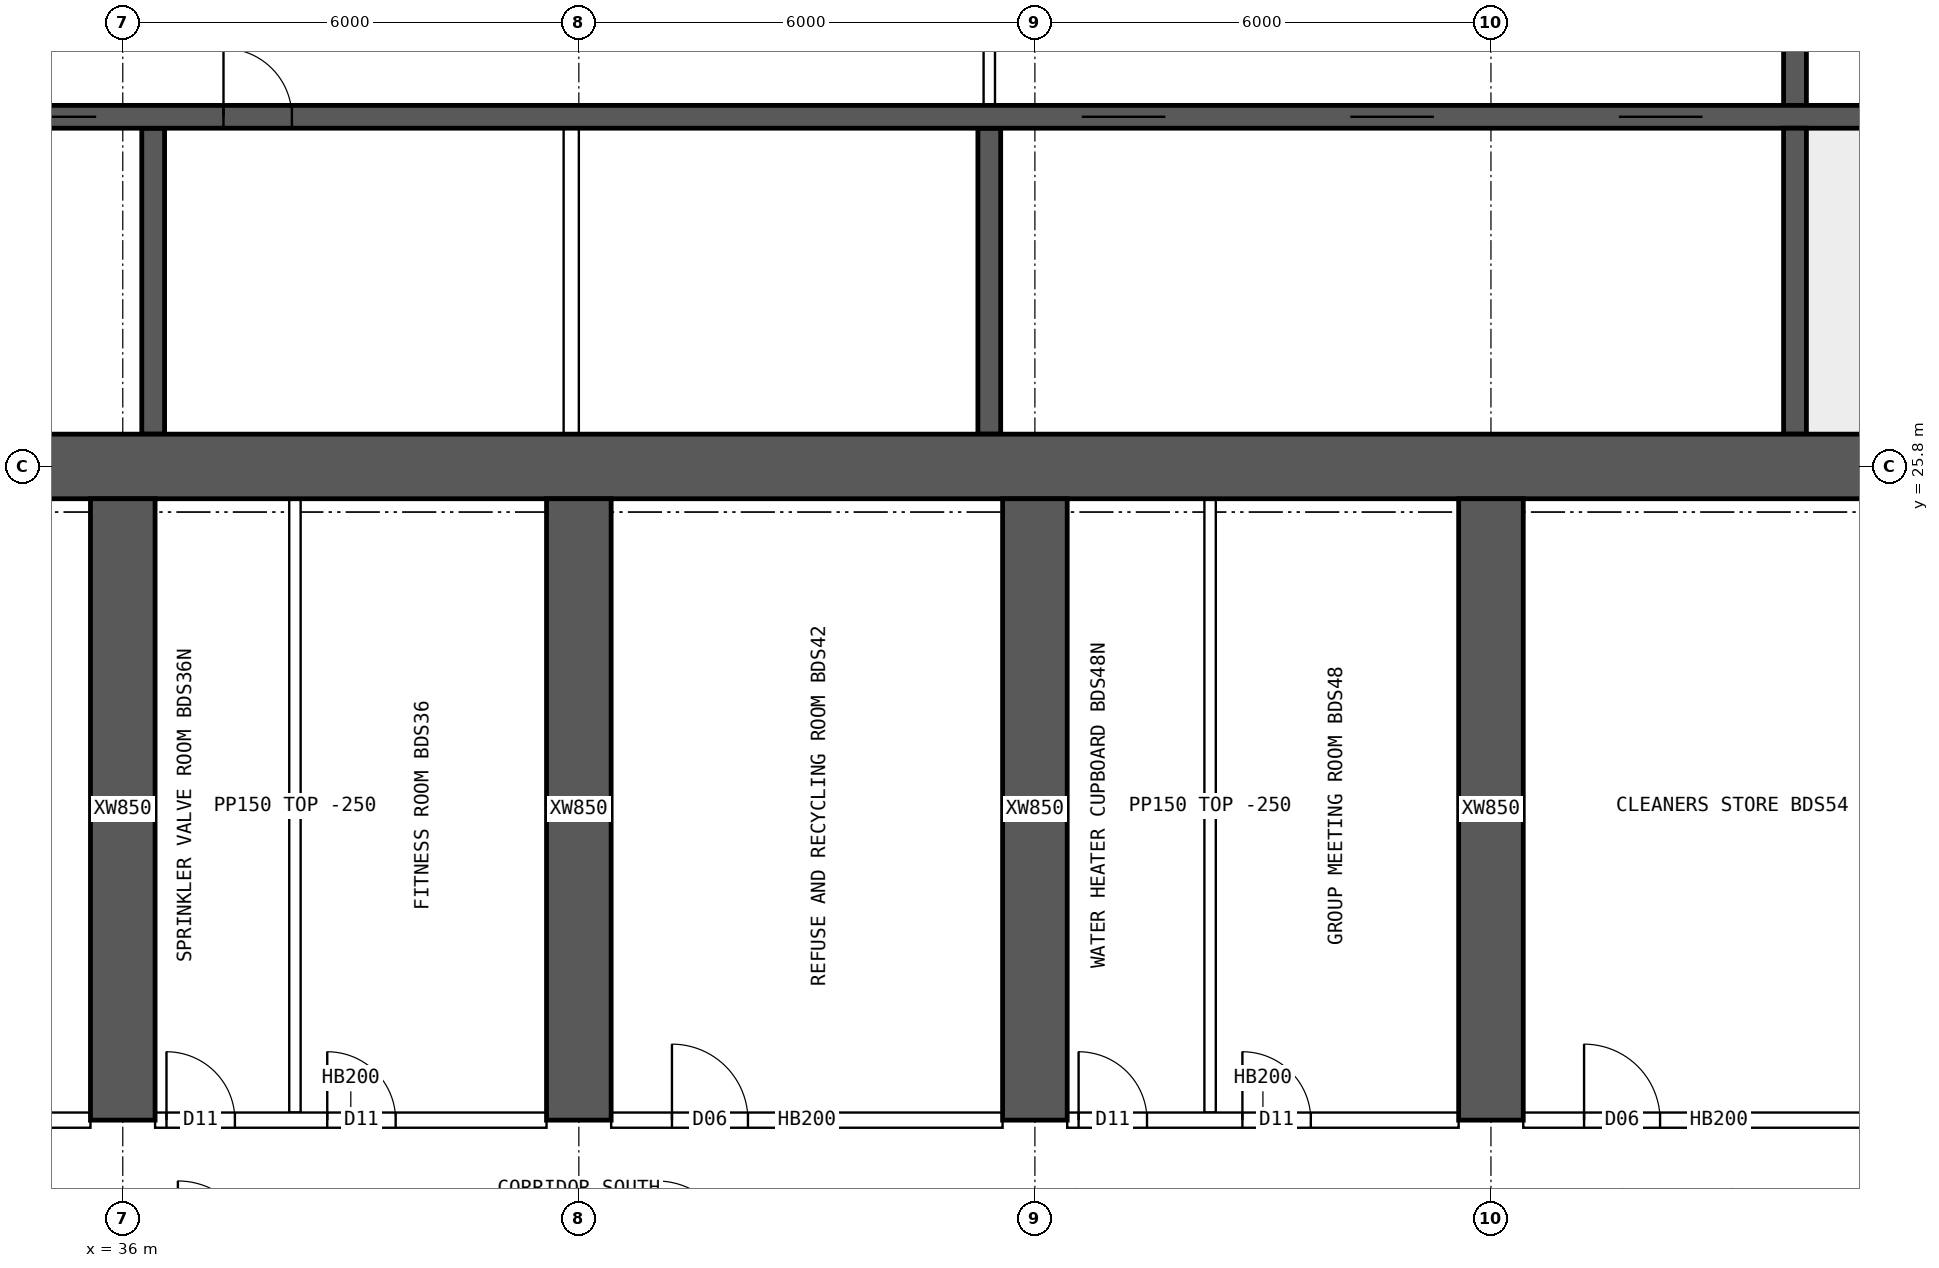
"""IFC4 building model, lengths in metres.
Left out: names, types, materials, properties, quantities, classifications, styles, units other than length and angle.
Written with IfcOpenShell. Run it as: python <this file> out.ifc"""

import sys

from ifc_helpers import new_model, si_unit, direction, frame, frame_2d, origin, place, context, subcontext, project, spatial, rectangle, extrude, element, fill, save


model = new_model("IFC4")
c1 = context("Model", 3, precision=1e-05, world=origin(), true_north=direction((0.0, 1.0)))
c2 = subcontext(c1, "Body", "Model", "MODEL_VIEW")
j1 = project(units=[si_unit("LENGTHUNIT", "METRE"), si_unit("PLANEANGLEUNIT", "RADIAN")], contexts=[c1])
p1 = place(None, origin())
s1 = spatial("IfcSite", under=j1, at=p1, CompositionType="ELEMENT")
p2 = place(p1, origin())
s2 = spatial("IfcBuilding", under=s1, at=p2, CompositionType="ELEMENT")
p3 = place(p2, frame((0.0, 0.0, 193.6)))
s3 = spatial("IfcBuildingStorey", under=s2, at=p3, CompositionType="ELEMENT", Elevation=193.6)
p4 = place(p3, frame((18.0, 25.8, 0.0), z_axis=(0.0, 0.0, 1.0), x_axis=(1.0, 0.0, 0.0)))
e1 = element("IfcWall", 1, at=p4, inside=s3, PredefinedType="SHEAR", context=c2, shape_type="SweptSolid", body=[
    extrude(rectangle(XDim=48.0, YDim=0.85, at=frame_2d((24.0, 0.0))), origin(), (0.0, 0.0, 1.0), 3.75),
])
p5 = place(p3, frame((18.425, 30.4, 0.0), z_axis=(0.0, 0.0, 1.0), x_axis=(1.0, 0.0, 0.0)))
e2 = element("IfcWall", 2, at=p5, inside=s3, PredefinedType="SHEAR", context=c2, shape_type="SweptSolid", body=[
    extrude(rectangle(XDim=47.15, YDim=0.3, at=frame_2d((23.575, 0.0))), origin(), (0.0, 0.0, 1.0), 3.75),
])
p6 = place(p5, frame((0.4, 0.0, 0.0)))
e3 = element("IfcOpeningElement", 3, at=p6, cuts=e2, PredefinedType="OPENING", context=c2, shape_type="SweptSolid", body=[
    extrude(rectangle(XDim=1.0, YDim=2.1, at=frame_2d((0.5, 1.05))), frame((0.0, 0.16, 0.0), z_axis=(0.0, -1.0, 0.0), x_axis=(1.0, 0.0, 0.0)), (0.0, 0.0, 1.0), 0.32),
])
p7 = place(p5, frame((45.75, 0.0, 0.0)))
e4 = element("IfcOpeningElement", 4, at=p7, cuts=e2, PredefinedType="OPENING", context=c2, shape_type="SweptSolid", body=[
    extrude(rectangle(XDim=1.0, YDim=2.1, at=frame_2d((0.5, 1.05))), frame((0.0, 0.16, 0.0), z_axis=(0.0, -1.0, 0.0), x_axis=(1.0, 0.0, 0.0)), (0.0, 0.0, 1.0), 0.32),
])
p8 = place(p5, frame((8.325, 0.0, 0.0)))
e5 = element("IfcOpeningElement", 5, at=p8, cuts=e2, PredefinedType="OPENING", context=c2, shape_type="SweptSolid", body=[
    extrude(rectangle(XDim=1.1, YDim=2.1, at=frame_2d((0.55, 1.05))), frame((0.0, 0.16, 0.0), z_axis=(0.0, -1.0, 0.0), x_axis=(1.0, 0.0, 0.0)), (0.0, 0.0, 1.0), 0.32),
])
p9 = place(p5, frame((10.925, 0.0, 0.0)))
e6 = element("IfcOpeningElement", 6, at=p9, cuts=e2, PredefinedType="OPENING", context=c2, shape_type="SweptSolid", body=[
    extrude(rectangle(XDim=1.1, YDim=2.1, at=frame_2d((0.55, 1.05))), frame((0.0, 0.16, 0.0), z_axis=(0.0, -1.0, 0.0), x_axis=(1.0, 0.0, 0.0)), (0.0, 0.0, 1.0), 0.32),
])
p10 = place(p5, frame((13.525, 0.0, 0.0)))
e7 = element("IfcOpeningElement", 7, at=p10, cuts=e2, PredefinedType="OPENING", context=c2, shape_type="SweptSolid", body=[
    extrude(rectangle(XDim=1.1, YDim=2.1, at=frame_2d((0.55, 1.05))), frame((0.0, 0.16, 0.0), z_axis=(0.0, -1.0, 0.0), x_axis=(1.0, 0.0, 0.0)), (0.0, 0.0, 1.0), 0.32),
])
p11 = place(p5, frame((16.125, 0.0, 0.0)))
e8 = element("IfcOpeningElement", 8, at=p11, cuts=e2, PredefinedType="OPENING", context=c2, shape_type="SweptSolid", body=[
    extrude(rectangle(XDim=1.1, YDim=2.1, at=frame_2d((0.55, 1.05))), frame((0.0, 0.16, 0.0), z_axis=(0.0, -1.0, 0.0), x_axis=(1.0, 0.0, 0.0)), (0.0, 0.0, 1.0), 0.32),
])
p12 = place(p5, frame((18.9, 0.0, 0.0)))
e9 = element("IfcOpeningElement", 9, at=p12, cuts=e2, PredefinedType="OPENING", context=c2, shape_type="SweptSolid", body=[
    extrude(rectangle(XDim=0.9, YDim=2.1, at=frame_2d((0.45, 1.05))), frame((0.0, 0.16, 0.0), z_axis=(0.0, -1.0, 0.0), x_axis=(1.0, 0.0, 0.0)), (0.0, 0.0, 1.0), 0.32),
])
p13 = place(p5, frame((30.192, 0.0, 0.0)))
e10 = element("IfcOpeningElement", 10, at=p13, cuts=e2, PredefinedType="OPENING", context=c2, shape_type="SweptSolid", body=[
    extrude(rectangle(XDim=1.1, YDim=2.1, at=frame_2d((0.55, 1.05))), frame((0.0, 0.16, 0.0), z_axis=(0.0, -1.0, 0.0), x_axis=(1.0, 0.0, 0.0)), (0.0, 0.0, 1.0), 0.32),
])
p14 = place(p5, frame((33.725, 0.0, 0.0)))
e11 = element("IfcOpeningElement", 11, at=p14, cuts=e2, PredefinedType="OPENING", context=c2, shape_type="SweptSolid", body=[
    extrude(rectangle(XDim=1.1, YDim=2.1, at=frame_2d((0.55, 1.05))), frame((0.0, 0.16, 0.0), z_axis=(0.0, -1.0, 0.0), x_axis=(1.0, 0.0, 0.0)), (0.0, 0.0, 1.0), 0.32),
])
p15 = place(p5, frame((37.258, 0.0, 0.0)))
e12 = element("IfcOpeningElement", 12, at=p15, cuts=e2, PredefinedType="OPENING", context=c2, shape_type="SweptSolid", body=[
    extrude(rectangle(XDim=1.1, YDim=2.1, at=frame_2d((0.55, 1.05))), frame((0.0, 0.16, 0.0), z_axis=(0.0, -1.0, 0.0), x_axis=(1.0, 0.0, 0.0)), (0.0, 0.0, 1.0), 0.32),
])
p16 = place(p3, frame((58.0, 26.225, 0.0), z_axis=(0.0, 0.0, 1.0), x_axis=(0.0, 1.0, 0.0)))
e13 = element("IfcWall", 13, at=p16, inside=s3, PredefinedType="SHEAR", context=c2, shape_type="SweptSolid", body=[
    extrude(rectangle(XDim=4.025, YDim=0.3, at=frame_2d((2.012, 0.0))), origin(), (0.0, 0.0, 1.0), 3.75),
])
p17 = place(p3, frame((58.0, 30.55, 0.0), z_axis=(0.0, 0.0, 1.0), x_axis=(0.0, 1.0, 0.0)))
e14 = element("IfcWall", 14, at=p17, inside=s3, PredefinedType="SHEAR", context=c2, shape_type="SweptSolid", body=[
    extrude(rectangle(XDim=3.9, YDim=0.3, at=frame_2d((1.95, 0.0))), origin(), (0.0, 0.0, 1.0), 3.75),
])
p18 = place(p17, frame((1.4, 0.0, 0.0)))
e15 = element("IfcOpeningElement", 15, at=p18, cuts=e14, PredefinedType="OPENING", context=c2, shape_type="SweptSolid", body=[
    extrude(rectangle(XDim=1.2, YDim=2.1, at=frame_2d((0.6, 1.05))), frame((0.0, 0.16, 0.0), z_axis=(0.0, -1.0, 0.0), x_axis=(1.0, 0.0, 0.0)), (0.0, 0.0, 1.0), 0.32),
])
for number, where, z_axis, x_axis in (
    (16, (36.4, 26.225, 0.0), (0.0, 0.0, 1.0), (0.0, 1.0, 0.0)),
    (17, (47.4, 26.225, 0.0), (0.0, 0.0, 1.0), (0.0, 1.0, 0.0)),
):
    element("IfcWall", number, at=place(p3, frame(where, z_axis=z_axis, x_axis=x_axis)), inside=s3, PredefinedType="SHEAR", context=c2, shape_type="SweptSolid", body=[
        extrude(rectangle(XDim=4.025, YDim=0.3, at=frame_2d((2.012, 0.0))), origin(), (0.0, 0.0, 1.0), 3.75),
    ])
for number, where, z_axis, x_axis in (
    (18, (36.0, 17.2, 0.0), (0.0, 0.0, 1.0), (0.0, 1.0, 0.0)),
    (19, (42.0, 17.2, 0.0), (0.0, 0.0, 1.0), (0.0, 1.0, 0.0)),
    (20, (48.0, 17.2, 0.0), (0.0, 0.0, 1.0), (0.0, 1.0, 0.0)),
    (21, (54.0, 17.2, 0.0), (0.0, 0.0, 1.0), (0.0, 1.0, 0.0)),
):
    element("IfcWall", number, at=place(p3, frame(where, z_axis=z_axis, x_axis=x_axis)), inside=s3, PredefinedType="SHEAR", context=c2, shape_type="SweptSolid", body=[
        extrude(rectangle(XDim=8.175, YDim=0.85, at=frame_2d((4.087, 0.0))), origin(), (0.0, 0.0, 1.0), 3.75),
    ])
p19 = place(p3, frame((47.4, 30.55, 0.0), z_axis=(0.0, 0.0, 1.0), x_axis=(0.0, 1.0, 0.0)))
e22 = element("IfcWall", 22, at=p19, inside=s3, PredefinedType="SOLIDWALL", context=c2, shape_type="SweptSolid", body=[
    extrude(rectangle(XDim=3.9, YDim=0.15, at=frame_2d((1.95, 0.0))), origin(), (0.0, 0.0, 1.0), 3.5),
])
p20 = place(p19, frame((1.15, 0.0, 0.0)))
e23 = element("IfcOpeningElement", 23, at=p20, cuts=e22, PredefinedType="OPENING", context=c2, shape_type="SweptSolid", body=[
    extrude(rectangle(XDim=1.6, YDim=2.1, at=frame_2d((0.8, 1.05))), frame((0.0, 0.085, 0.0), z_axis=(0.0, -1.0, 0.0), x_axis=(1.0, 0.0, 0.0)), (0.0, 0.0, 1.0), 0.17),
])
p21 = place(p3, frame((41.9, 26.225, 0.0), z_axis=(0.0, 0.0, 1.0), x_axis=(0.0, 1.0, 0.0)))
e24 = element("IfcWall", 24, at=p21, inside=s3, PredefinedType="SOLIDWALL", context=c2, shape_type="SweptSolid", body=[
    extrude(rectangle(XDim=4.025, YDim=0.2, at=frame_2d((2.012, 0.0))), origin(), (0.0, 0.0, 1.0), 3.5),
])
p22 = place(p3, frame((30.425, 17.2, 0.0), z_axis=(0.0, 0.0, 1.0), x_axis=(1.0, 0.0, 0.0)))
e25 = element("IfcWall", 25, at=p22, inside=s3, PredefinedType="SOLIDWALL", context=c2, shape_type="SweptSolid", body=[
    extrude(rectangle(XDim=5.15, YDim=0.2, at=frame_2d((2.575, 0.0))), origin(), (0.0, 0.0, 1.0), 3.5),
])
p23 = place(p22, frame((0.8, 0.0, 0.0)))
e26 = element("IfcOpeningElement", 26, at=p23, cuts=e25, PredefinedType="OPENING", context=c2, shape_type="SweptSolid", body=[
    extrude(rectangle(XDim=1.0, YDim=2.1, at=frame_2d((0.5, 1.05))), frame((0.0, 0.11, 0.0), z_axis=(0.0, -1.0, 0.0), x_axis=(1.0, 0.0, 0.0)), (0.0, 0.0, 1.0), 0.22),
])
p24 = place(p3, frame((36.425, 17.2, 0.0), z_axis=(0.0, 0.0, 1.0), x_axis=(1.0, 0.0, 0.0)))
e27 = element("IfcWall", 27, at=p24, inside=s3, PredefinedType="SOLIDWALL", context=c2, shape_type="SweptSolid", body=[
    extrude(rectangle(XDim=5.15, YDim=0.2, at=frame_2d((2.575, 0.0))), origin(), (0.0, 0.0, 1.0), 3.5),
])
p25 = place(p24, frame((0.15, 0.0, 0.0)))
e28 = element("IfcOpeningElement", 28, at=p25, cuts=e27, PredefinedType="OPENING", context=c2, shape_type="SweptSolid", body=[
    extrude(rectangle(XDim=0.9, YDim=2.1, at=frame_2d((0.45, 1.05))), frame((0.0, 0.11, 0.0), z_axis=(0.0, -1.0, 0.0), x_axis=(1.0, 0.0, 0.0)), (0.0, 0.0, 1.0), 0.22),
])
p26 = place(p24, frame((2.265, 0.0, 0.0)))
e29 = element("IfcOpeningElement", 29, at=p26, cuts=e27, PredefinedType="OPENING", context=c2, shape_type="SweptSolid", body=[
    extrude(rectangle(XDim=0.9, YDim=2.1, at=frame_2d((0.45, 1.05))), frame((0.0, 0.11, 0.0), z_axis=(0.0, -1.0, 0.0), x_axis=(1.0, 0.0, 0.0)), (0.0, 0.0, 1.0), 0.22),
])
p27 = place(p3, frame((42.425, 17.2, 0.0), z_axis=(0.0, 0.0, 1.0), x_axis=(1.0, 0.0, 0.0)))
e30 = element("IfcWall", 30, at=p27, inside=s3, PredefinedType="SOLIDWALL", context=c2, shape_type="SweptSolid", body=[
    extrude(rectangle(XDim=5.15, YDim=0.2, at=frame_2d((2.575, 0.0))), origin(), (0.0, 0.0, 1.0), 3.5),
])
p28 = place(p27, frame((0.8, 0.0, 0.0)))
e31 = element("IfcOpeningElement", 31, at=p28, cuts=e30, PredefinedType="OPENING", context=c2, shape_type="SweptSolid", body=[
    extrude(rectangle(XDim=1.0, YDim=2.1, at=frame_2d((0.5, 1.05))), frame((0.0, 0.11, 0.0), z_axis=(0.0, -1.0, 0.0), x_axis=(1.0, 0.0, 0.0)), (0.0, 0.0, 1.0), 0.22),
])
p29 = place(p3, frame((48.425, 17.2, 0.0), z_axis=(0.0, 0.0, 1.0), x_axis=(1.0, 0.0, 0.0)))
e32 = element("IfcWall", 32, at=p29, inside=s3, PredefinedType="SOLIDWALL", context=c2, shape_type="SweptSolid", body=[
    extrude(rectangle(XDim=5.15, YDim=0.2, at=frame_2d((2.575, 0.0))), origin(), (0.0, 0.0, 1.0), 3.5),
])
p30 = place(p29, frame((0.15, 0.0, 0.0)))
e33 = element("IfcOpeningElement", 33, at=p30, cuts=e32, PredefinedType="OPENING", context=c2, shape_type="SweptSolid", body=[
    extrude(rectangle(XDim=0.9, YDim=2.1, at=frame_2d((0.45, 1.05))), frame((0.0, 0.11, 0.0), z_axis=(0.0, -1.0, 0.0), x_axis=(1.0, 0.0, 0.0)), (0.0, 0.0, 1.0), 0.22),
])
p31 = place(p29, frame((2.305, 0.0, 0.0)))
e34 = element("IfcOpeningElement", 34, at=p31, cuts=e32, PredefinedType="OPENING", context=c2, shape_type="SweptSolid", body=[
    extrude(rectangle(XDim=0.9, YDim=2.1, at=frame_2d((0.45, 1.05))), frame((0.0, 0.11, 0.0), z_axis=(0.0, -1.0, 0.0), x_axis=(1.0, 0.0, 0.0)), (0.0, 0.0, 1.0), 0.22),
])
p32 = place(p3, frame((54.425, 17.2, 0.0), z_axis=(0.0, 0.0, 1.0), x_axis=(1.0, 0.0, 0.0)))
e35 = element("IfcWall", 35, at=p32, inside=s3, PredefinedType="SOLIDWALL", context=c2, shape_type="SweptSolid", body=[
    extrude(rectangle(XDim=5.15, YDim=0.2, at=frame_2d((2.575, 0.0))), origin(), (0.0, 0.0, 1.0), 3.5),
])
p33 = place(p32, frame((0.8, 0.0, 0.0)))
e36 = element("IfcOpeningElement", 36, at=p33, cuts=e35, PredefinedType="OPENING", context=c2, shape_type="SweptSolid", body=[
    extrude(rectangle(XDim=1.0, YDim=2.1, at=frame_2d((0.5, 1.05))), frame((0.0, 0.11, 0.0), z_axis=(0.0, -1.0, 0.0), x_axis=(1.0, 0.0, 0.0)), (0.0, 0.0, 1.0), 0.22),
])
for number, where, z_axis, x_axis in (
    (37, (38.265, 17.3, 0.0), (0.0, 0.0, 1.0), (0.0, 1.0, 0.0)),
    (38, (50.305, 17.3, 0.0), (0.0, 0.0, 1.0), (0.0, 1.0, 0.0)),
):
    element("IfcWall", number, at=place(p3, frame(where, z_axis=z_axis, x_axis=x_axis)), inside=s3, PredefinedType="PARTITIONING", context=c2, shape_type="SweptSolid", body=[
        extrude(rectangle(XDim=8.075, YDim=0.15, at=frame_2d((4.038, 0.0))), origin(), (0.0, 0.0, 1.0), 3.5),
    ])
p34 = place(p11, origin())
e39 = element("IfcDoor", 39, at=p34, inside=s3, OperationType="DOUBLE_DOOR_SLIDING", PredefinedType="DOOR", context=c2, shape_type="SweptSolid", body=[
    extrude(rectangle(XDim=1.1, YDim=2.1, at=frame_2d((0.55, 1.05))), frame((0.0, 0.025, 0.0), z_axis=(0.0, -1.0, 0.0), x_axis=(1.0, 0.0, 0.0)), (0.0, 0.0, 1.0), 0.05),
])
fill(e8, e39)
p35 = place(p12, origin())
e40 = element("IfcDoor", 40, at=p35, inside=s3, OperationType="SINGLE_SWING_LEFT", PredefinedType="DOOR", context=c2, shape_type="SweptSolid", body=[
    extrude(rectangle(XDim=0.9, YDim=2.1, at=frame_2d((0.45, 1.05))), frame((0.0, 0.025, 0.0), z_axis=(0.0, -1.0, 0.0), x_axis=(1.0, 0.0, 0.0)), (0.0, 0.0, 1.0), 0.05),
])
fill(e9, e40)
p36 = place(p13, origin())
e41 = element("IfcDoor", 41, at=p36, inside=s3, OperationType="DOUBLE_DOOR_SLIDING", PredefinedType="DOOR", context=c2, shape_type="SweptSolid", body=[
    extrude(rectangle(XDim=1.1, YDim=2.1, at=frame_2d((0.55, 1.05))), frame((0.0, 0.025, 0.0), z_axis=(0.0, -1.0, 0.0), x_axis=(1.0, 0.0, 0.0)), (0.0, 0.0, 1.0), 0.05),
])
fill(e10, e41)
p37 = place(p14, origin())
e42 = element("IfcDoor", 42, at=p37, inside=s3, OperationType="DOUBLE_DOOR_SLIDING", PredefinedType="DOOR", context=c2, shape_type="SweptSolid", body=[
    extrude(rectangle(XDim=1.1, YDim=2.1, at=frame_2d((0.55, 1.05))), frame((0.0, 0.025, 0.0), z_axis=(0.0, -1.0, 0.0), x_axis=(1.0, 0.0, 0.0)), (0.0, 0.0, 1.0), 0.05),
])
fill(e11, e42)
p38 = place(p15, origin())
e43 = element("IfcDoor", 43, at=p38, inside=s3, OperationType="DOUBLE_DOOR_SLIDING", PredefinedType="DOOR", context=c2, shape_type="SweptSolid", body=[
    extrude(rectangle(XDim=1.1, YDim=2.1, at=frame_2d((0.55, 1.05))), frame((0.0, 0.025, 0.0), z_axis=(0.0, -1.0, 0.0), x_axis=(1.0, 0.0, 0.0)), (0.0, 0.0, 1.0), 0.05),
])
fill(e12, e43)
p39 = place(p25, origin())
e44 = element("IfcDoor", 44, at=p39, inside=s3, OperationType="SINGLE_SWING_LEFT", PredefinedType="DOOR", context=c2, shape_type="SweptSolid", body=[
    extrude(rectangle(XDim=0.9, YDim=2.1, at=frame_2d((0.45, 1.05))), frame((0.0, 0.025, 0.0), z_axis=(0.0, -1.0, 0.0), x_axis=(1.0, 0.0, 0.0)), (0.0, 0.0, 1.0), 0.05),
])
fill(e28, e44)
p40 = place(p26, origin())
e45 = element("IfcDoor", 45, at=p40, inside=s3, OperationType="SINGLE_SWING_LEFT", PredefinedType="DOOR", context=c2, shape_type="SweptSolid", body=[
    extrude(rectangle(XDim=0.9, YDim=2.1, at=frame_2d((0.45, 1.05))), frame((0.0, 0.025, 0.0), z_axis=(0.0, -1.0, 0.0), x_axis=(1.0, 0.0, 0.0)), (0.0, 0.0, 1.0), 0.05),
])
fill(e29, e45)
p41 = place(p28, origin())
e46 = element("IfcDoor", 46, at=p41, inside=s3, OperationType="SINGLE_SWING_LEFT", PredefinedType="DOOR", context=c2, shape_type="SweptSolid", body=[
    extrude(rectangle(XDim=1.0, YDim=2.1, at=frame_2d((0.5, 1.05))), frame((0.0, 0.025, 0.0), z_axis=(0.0, -1.0, 0.0), x_axis=(1.0, 0.0, 0.0)), (0.0, 0.0, 1.0), 0.05),
])
fill(e31, e46)
p42 = place(p30, origin())
e47 = element("IfcDoor", 47, at=p42, inside=s3, OperationType="SINGLE_SWING_LEFT", PredefinedType="DOOR", context=c2, shape_type="SweptSolid", body=[
    extrude(rectangle(XDim=0.9, YDim=2.1, at=frame_2d((0.45, 1.05))), frame((0.0, 0.025, 0.0), z_axis=(0.0, -1.0, 0.0), x_axis=(1.0, 0.0, 0.0)), (0.0, 0.0, 1.0), 0.05),
])
fill(e33, e47)
p43 = place(p31, origin())
e48 = element("IfcDoor", 48, at=p43, inside=s3, OperationType="SINGLE_SWING_LEFT", PredefinedType="DOOR", context=c2, shape_type="SweptSolid", body=[
    extrude(rectangle(XDim=0.9, YDim=2.1, at=frame_2d((0.45, 1.05))), frame((0.0, 0.025, 0.0), z_axis=(0.0, -1.0, 0.0), x_axis=(1.0, 0.0, 0.0)), (0.0, 0.0, 1.0), 0.05),
])
fill(e34, e48)
p44 = place(p33, origin())
e49 = element("IfcDoor", 49, at=p44, inside=s3, OperationType="SINGLE_SWING_LEFT", PredefinedType="DOOR", context=c2, shape_type="SweptSolid", body=[
    extrude(rectangle(XDim=1.0, YDim=2.1, at=frame_2d((0.5, 1.05))), frame((0.0, 0.025, 0.0), z_axis=(0.0, -1.0, 0.0), x_axis=(1.0, 0.0, 0.0)), (0.0, 0.0, 1.0), 0.05),
])
fill(e36, e49)
save(model, sys.argv[1])
